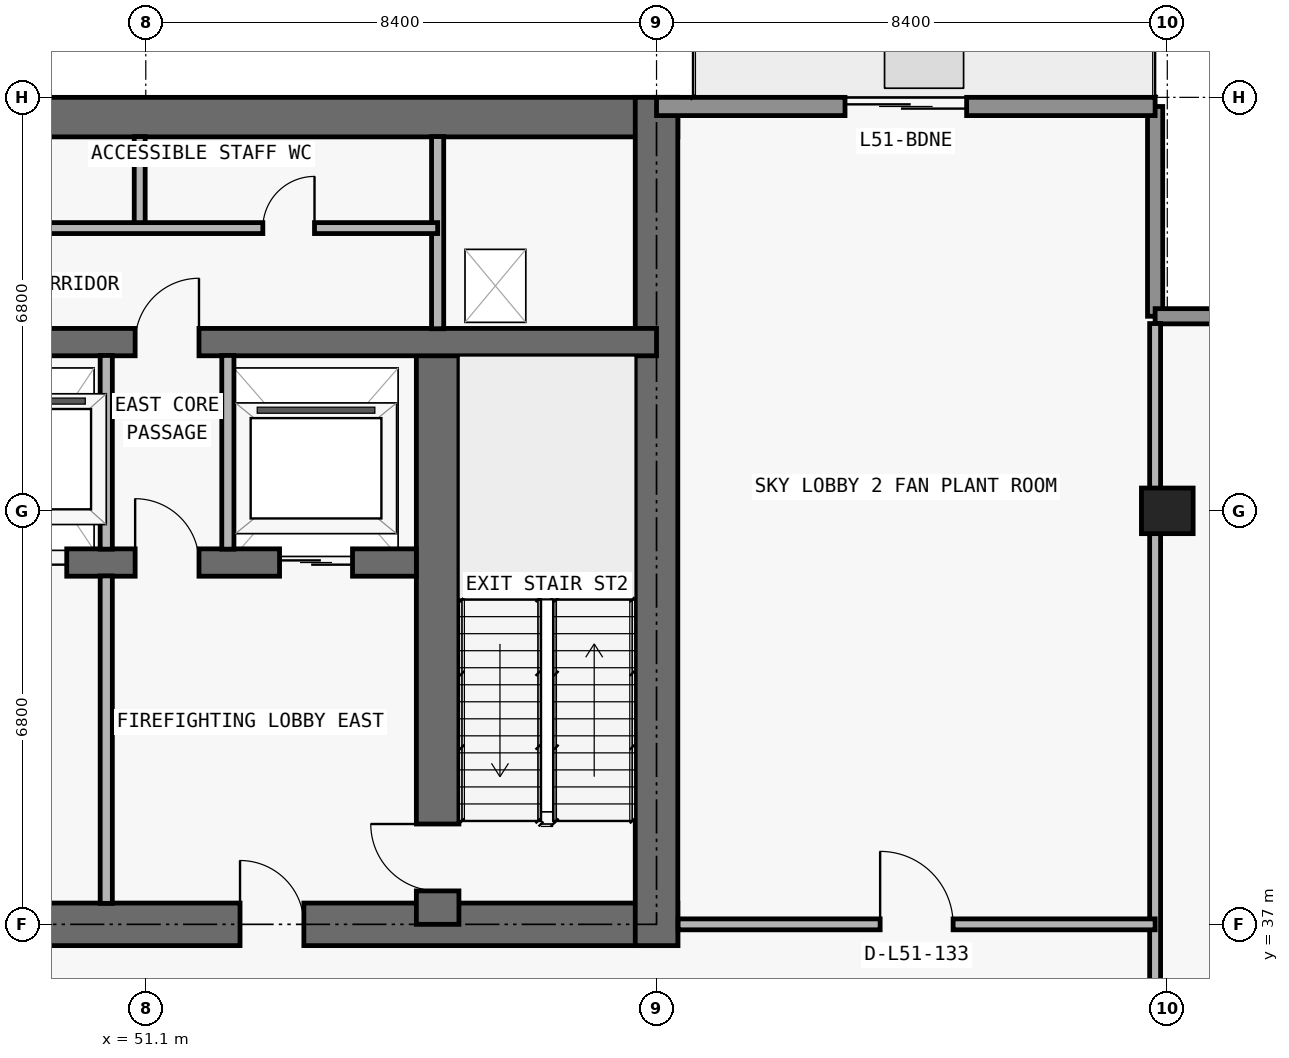
"""IFC4 building model, lengths in metres.
Left out: names, types, materials, properties, quantities, classifications, styles, units other than length and angle.
Written with IfcOpenShell. Run it as: python <this file> out.ifc"""

import sys

from ifc_helpers import new_model, si_unit, direction, frame, frame_2d, origin, origin_2d, place, context, subcontext, project, spatial, rectangle, extrude, element, fill, save


model = new_model("IFC4")
c1 = context("Model", 3, precision=1e-05, world=origin(), true_north=direction((0.0, 1.0)))
c2 = subcontext(c1, "Body", "Model", "MODEL_VIEW")
j1 = project(units=[si_unit("LENGTHUNIT", "METRE"), si_unit("PLANEANGLEUNIT", "RADIAN")], contexts=[c1])
p1 = place(None, origin())
s1 = spatial("IfcSite", under=j1, at=p1, CompositionType="ELEMENT")
p2 = place(p1, origin())
s2 = spatial("IfcBuilding", under=s1, at=p2, CompositionType="ELEMENT")
p3 = place(p2, frame((0.0, 0.0, 183.6)))
s3 = spatial("IfcBuildingStorey", under=s2, at=p3, CompositionType="ELEMENT", Elevation=183.6)
p4 = place(p3, frame((67.9, 43.8, 0.0), z_axis=(0.0, 0.0, 1.0), x_axis=(1.0, 0.0, 0.0)))
e1 = element("IfcColumn", 1, at=p4, inside=s3, PredefinedType="COLUMN", context=c2, shape_type="SweptSolid", body=[
    extrude(rectangle(XDim=0.85, YDim=0.75, at=origin_2d()), origin(), (0.0, 0.0, 1.0), 4.55),
])
p5 = place(p3, frame((17.95, 37.0, 0.0), z_axis=(0.0, 0.0, 1.0), x_axis=(1.0, 0.0, 0.0)))
e2 = element("IfcWall", 2, at=p5, inside=s3, PredefinedType="SHEAR", context=c2, shape_type="SweptSolid", body=[
    extrude(rectangle(XDim=41.9, YDim=0.7, at=frame_2d((20.95, 0.0))), origin(), (0.0, 0.0, 1.0), 4.55),
])
p6 = place(p5, frame((14.35, 0.0, 0.0)))
e3 = element("IfcOpeningElement", 3, at=p6, cuts=e2, PredefinedType="OPENING", context=c2, shape_type="SweptSolid", body=[
    extrude(rectangle(XDim=1.1, YDim=2.15, at=frame_2d((0.55, 1.075))), frame((0.0, 0.36, 0.0), z_axis=(0.0, -1.0, 0.0), x_axis=(1.0, 0.0, 0.0)), (0.0, 0.0, 1.0), 0.72),
])
p7 = place(p5, frame((6.2, 0.0, 0.0)))
e4 = element("IfcOpeningElement", 4, at=p7, cuts=e2, PredefinedType="OPENING", context=c2, shape_type="SweptSolid", body=[
    extrude(rectangle(XDim=1.05, YDim=2.15, at=frame_2d((0.525, 1.075))), frame((0.0, 0.36, 0.0), z_axis=(0.0, -1.0, 0.0), x_axis=(1.0, 0.0, 0.0)), (0.0, 0.0, 1.0), 0.72),
])
p8 = place(p5, frame((34.7, 0.0, 0.0)))
e5 = element("IfcOpeningElement", 5, at=p8, cuts=e2, PredefinedType="OPENING", context=c2, shape_type="SweptSolid", body=[
    extrude(rectangle(XDim=1.05, YDim=2.15, at=frame_2d((0.525, 1.075))), frame((0.0, 0.36, 0.0), z_axis=(0.0, -1.0, 0.0), x_axis=(1.0, 0.0, 0.0)), (0.0, 0.0, 1.0), 0.72),
])
p9 = place(p5, frame((10.812, 0.0, 0.0)))
e6 = element("IfcOpeningElement", 6, at=p9, cuts=e2, PredefinedType="OPENING", context=c2, shape_type="SweptSolid", body=[
    extrude(rectangle(XDim=1.05, YDim=2.15, at=frame_2d((0.525, 1.075))), frame((0.0, 0.36, 0.0), z_axis=(0.0, -1.0, 0.0), x_axis=(1.0, 0.0, 0.0)), (0.0, 0.0, 1.0), 0.72),
])
p10 = place(p5, frame((24.05, 0.0, 0.0)))
e7 = element("IfcOpeningElement", 7, at=p10, cuts=e2, PredefinedType="OPENING", context=c2, shape_type="SweptSolid", body=[
    extrude(rectangle(XDim=1.05, YDim=2.15, at=frame_2d((0.525, 1.075))), frame((0.0, 0.36, 0.0), z_axis=(0.0, -1.0, 0.0), x_axis=(1.0, 0.0, 0.0)), (0.0, 0.0, 1.0), 0.72),
])
p11 = place(p3, frame((17.95, 50.275, 0.0), z_axis=(0.0, 0.0, 1.0), x_axis=(1.0, 0.0, 0.0)))
e8 = element("IfcWall", 8, at=p11, inside=s3, PredefinedType="SHEAR", context=c2, shape_type="SweptSolid", body=[
    extrude(rectangle(XDim=41.9, YDim=0.65, at=frame_2d((20.95, 0.0))), origin(), (0.0, 0.0, 1.0), 4.55),
])
p12 = place(p3, frame((59.5, 36.65, 0.0), z_axis=(0.0, 0.0, 1.0), x_axis=(0.0, 1.0, 0.0)))
e9 = element("IfcWall", 9, at=p12, inside=s3, PredefinedType="SHEAR", context=c2, shape_type="SweptSolid", body=[
    extrude(rectangle(XDim=13.95, YDim=0.7, at=frame_2d((6.975, 0.0))), origin(), (0.0, 0.0, 1.0), 4.55),
])
p13 = place(p3, frame((55.9, 37.0, 0.0), z_axis=(0.0, 0.0, 1.0), x_axis=(0.0, 1.0, 0.0)))
e10 = element("IfcWall", 10, at=p13, inside=s3, PredefinedType="SHEAR", context=c2, shape_type="SweptSolid", body=[
    extrude(rectangle(XDim=9.575, YDim=0.7, at=frame_2d((4.788, 0.0))), origin(), (0.0, 0.0, 1.0), 4.55),
])
p14 = place(p13, frame((0.55, 0.0, 0.0)))
e11 = element("IfcOpeningElement", 11, at=p14, cuts=e10, PredefinedType="OPENING", context=c2, shape_type="SweptSolid", body=[
    extrude(rectangle(XDim=1.1, YDim=2.15, at=frame_2d((0.55, 1.075))), frame((0.0, 0.36, 0.0), z_axis=(0.0, -1.0, 0.0), x_axis=(1.0, 0.0, 0.0)), (0.0, 0.0, 1.0), 0.72),
])
p15 = place(p3, frame((22.25, 42.95, 0.0), z_axis=(0.0, 0.0, 1.0), x_axis=(1.0, 0.0, 0.0)))
e12 = element("IfcWall", 12, at=p15, inside=s3, PredefinedType="SHEAR", context=c2, shape_type="SweptSolid", body=[
    extrude(rectangle(XDim=33.3, YDim=0.45, at=frame_2d((16.65, 0.0))), origin(), (0.0, 0.0, 1.0), 4.55),
])
p16 = place(p15, frame((1.05, 0.0, 0.0)))
e13 = element("IfcOpeningElement", 13, at=p16, cuts=e12, PredefinedType="OPENING", context=c2, shape_type="SweptSolid", body=[
    extrude(rectangle(XDim=1.2, YDim=2.2, at=frame_2d((0.6, 1.1))), frame((0.0, 0.235, 0.0), z_axis=(0.0, -1.0, 0.0), x_axis=(1.0, 0.0, 0.0)), (0.0, 0.0, 1.0), 0.47),
])
p17 = place(p15, frame((31.05, 0.0, 0.0)))
e14 = element("IfcOpeningElement", 14, at=p17, cuts=e12, PredefinedType="OPENING", context=c2, shape_type="SweptSolid", body=[
    extrude(rectangle(XDim=1.2, YDim=2.2, at=frame_2d((0.6, 1.1))), frame((0.0, 0.235, 0.0), z_axis=(0.0, -1.0, 0.0), x_axis=(1.0, 0.0, 0.0)), (0.0, 0.0, 1.0), 0.47),
])
p18 = place(p15, frame((21.4, 0.0, 0.0)))
e15 = element("IfcOpeningElement", 15, at=p18, cuts=e12, PredefinedType="OPENING", context=c2, shape_type="SweptSolid", body=[
    extrude(rectangle(XDim=1.1, YDim=2.2, at=frame_2d((0.55, 1.1))), frame((0.0, 0.235, 0.0), z_axis=(0.0, -1.0, 0.0), x_axis=(1.0, 0.0, 0.0)), (0.0, 0.0, 1.0), 0.47),
])
p19 = place(p15, frame((24.0, 0.0, 0.0)))
e16 = element("IfcOpeningElement", 16, at=p19, cuts=e12, PredefinedType="OPENING", context=c2, shape_type="SweptSolid", body=[
    extrude(rectangle(XDim=1.1, YDim=2.2, at=frame_2d((0.55, 1.1))), frame((0.0, 0.235, 0.0), z_axis=(0.0, -1.0, 0.0), x_axis=(1.0, 0.0, 0.0)), (0.0, 0.0, 1.0), 0.47),
])
p20 = place(p15, frame((26.45, 0.0, 0.0)))
e17 = element("IfcOpeningElement", 17, at=p20, cuts=e12, PredefinedType="OPENING", context=c2, shape_type="SweptSolid", body=[
    extrude(rectangle(XDim=1.1, YDim=2.2, at=frame_2d((0.55, 1.1))), frame((0.0, 0.235, 0.0), z_axis=(0.0, -1.0, 0.0), x_axis=(1.0, 0.0, 0.0)), (0.0, 0.0, 1.0), 0.47),
])
p21 = place(p15, frame((5.95, 0.0, 0.0)))
e18 = element("IfcOpeningElement", 18, at=p21, cuts=e12, PredefinedType="OPENING", context=c2, shape_type="SweptSolid", body=[
    extrude(rectangle(XDim=1.1, YDim=2.2, at=frame_2d((0.55, 1.1))), frame((0.0, 0.235, 0.0), z_axis=(0.0, -1.0, 0.0), x_axis=(1.0, 0.0, 0.0)), (0.0, 0.0, 1.0), 0.47),
])
p22 = place(p15, frame((3.625, 0.0, 0.0)))
e19 = element("IfcOpeningElement", 19, at=p22, cuts=e12, PredefinedType="OPENING", context=c2, shape_type="SweptSolid", body=[
    extrude(rectangle(XDim=1.05, YDim=2.15, at=frame_2d((0.525, 1.075))), frame((0.0, 0.235, 0.0), z_axis=(0.0, -1.0, 0.0), x_axis=(1.0, 0.0, 0.0)), (0.0, 0.0, 1.0), 0.47),
])
p23 = place(p15, frame((28.675, 0.0, 0.0)))
e20 = element("IfcOpeningElement", 20, at=p23, cuts=e12, PredefinedType="OPENING", context=c2, shape_type="SweptSolid", body=[
    extrude(rectangle(XDim=1.05, YDim=2.15, at=frame_2d((0.525, 1.075))), frame((0.0, 0.235, 0.0), z_axis=(0.0, -1.0, 0.0), x_axis=(1.0, 0.0, 0.0)), (0.0, 0.0, 1.0), 0.47),
])
p24 = place(p15, frame((15.975, 0.0, 0.0)))
e21 = element("IfcOpeningElement", 21, at=p24, cuts=e12, PredefinedType="OPENING", context=c2, shape_type="SweptSolid", body=[
    extrude(rectangle(XDim=1.0, YDim=2.2, at=frame_2d((0.5, 1.1))), frame((0.0, 0.235, 0.0), z_axis=(0.0, -1.0, 0.0), x_axis=(1.0, 0.0, 0.0)), (0.0, 0.0, 1.0), 0.47),
])
p25 = place(p3, frame((18.3, 46.575, 0.0), z_axis=(0.0, 0.0, 1.0), x_axis=(1.0, 0.0, 0.0)))
e22 = element("IfcWall", 22, at=p25, inside=s3, PredefinedType="SHEAR", context=c2, shape_type="SweptSolid", body=[
    extrude(rectangle(XDim=41.2, YDim=0.45, at=frame_2d((20.6, 0.0))), origin(), (0.0, 0.0, 1.0), 4.55),
])
p26 = place(p25, frame((7.6, 0.0, 0.0)))
e23 = element("IfcOpeningElement", 23, at=p26, cuts=e22, PredefinedType="OPENING", context=c2, shape_type="SweptSolid", body=[
    extrude(rectangle(XDim=1.0, YDim=2.2, at=frame_2d((0.5, 1.1))), frame((0.0, 0.235, 0.0), z_axis=(0.0, -1.0, 0.0), x_axis=(1.0, 0.0, 0.0)), (0.0, 0.0, 1.0), 0.47),
])
p27 = place(p25, frame((32.625, 0.0, 0.0)))
e24 = element("IfcOpeningElement", 24, at=p27, cuts=e22, PredefinedType="OPENING", context=c2, shape_type="SweptSolid", body=[
    extrude(rectangle(XDim=1.05, YDim=2.15, at=frame_2d((0.525, 1.075))), frame((0.0, 0.235, 0.0), z_axis=(0.0, -1.0, 0.0), x_axis=(1.0, 0.0, 0.0)), (0.0, 0.0, 1.0), 0.47),
])
p28 = place(p3, frame((67.7, 50.45, 0.0), z_axis=(0.0, 0.0, 1.0), x_axis=(0.0, -1.0, 0.0)))
e25 = element("IfcWall", 25, at=p28, inside=s3, PredefinedType="ELEMENTEDWALL", context=c2, shape_type="SweptSolid", body=[
    extrude(rectangle(XDim=3.45, YDim=0.25, at=frame_2d((1.725, 0.0))), origin(), (0.0, 0.0, 1.0), 4.55),
])
p29 = place(p3, frame((67.7, 47.0, 0.0), z_axis=(0.0, 0.0, 1.0), x_axis=(1.0, 0.0, 0.0)))
e26 = element("IfcWall", 26, at=p29, inside=s3, PredefinedType="ELEMENTEDWALL", context=c2, shape_type="SweptSolid", body=[
    extrude(rectangle(XDim=3.85, YDim=0.25, at=frame_2d((1.925, 0.0))), origin(), (0.0, 0.0, 1.0), 4.55),
])
p30 = place(p3, frame((59.5, 50.45, 0.0), z_axis=(0.0, 0.0, 1.0), x_axis=(1.0, 0.0, 0.0)))
e27 = element("IfcWall", 27, at=p30, inside=s3, PredefinedType="STANDARD", context=c2, shape_type="SweptSolid", body=[
    extrude(rectangle(XDim=8.2, YDim=0.3, at=frame_2d((4.1, 0.0))), origin(), (0.0, 0.0, 1.0), 4.55),
])
p31 = place(p30, frame((3.1, 0.0, 0.0)))
e28 = element("IfcOpeningElement", 28, at=p31, cuts=e27, PredefinedType="OPENING", context=c2, shape_type="SweptSolid", body=[
    extrude(rectangle(XDim=2.0, YDim=2.3, at=frame_2d((1.0, 1.15))), frame((0.0, 0.16, 0.0), z_axis=(0.0, -1.0, 0.0), x_axis=(1.0, 0.0, 0.0)), (0.0, 0.0, 1.0), 0.32),
])
p32 = place(p3, frame((50.45, 37.345, 0.0), z_axis=(0.0, 0.0, 1.0), x_axis=(0.0, 1.0, 0.0)))
e29 = element("IfcWall", 29, at=p32, inside=s3, PredefinedType="PARTITIONING", context=c2, shape_type="SweptSolid", body=[
    extrude(rectangle(XDim=5.385, YDim=0.2, at=frame_2d((2.692, 0.0))), origin(), (0.0, 0.0, 1.0), 4.55),
])
p33 = place(p3, frame((50.45, 43.17, 0.0), z_axis=(0.0, 0.0, 1.0), x_axis=(0.0, 1.0, 0.0)))
e30 = element("IfcWall", 30, at=p33, inside=s3, PredefinedType="PARTITIONING", context=c2, shape_type="SweptSolid", body=[
    extrude(rectangle(XDim=3.185, YDim=0.2, at=frame_2d((1.593, 0.0))), origin(), (0.0, 0.0, 1.0), 4.55),
])
p34 = place(p3, frame((51.0, 48.45, 0.0), z_axis=(0.0, 0.0, 1.0), x_axis=(0.0, 1.0, 0.0)))
e31 = element("IfcWall", 31, at=p34, inside=s3, PredefinedType="PARTITIONING", context=c2, shape_type="SweptSolid", body=[
    extrude(rectangle(XDim=1.505, YDim=0.18, at=frame_2d((0.752, 0.0))), origin(), (0.0, 0.0, 1.0), 4.55),
])
p35 = place(p3, frame((52.45, 43.17, 0.0), z_axis=(0.0, 0.0, 1.0), x_axis=(0.0, 1.0, 0.0)))
e32 = element("IfcWall", 32, at=p35, inside=s3, PredefinedType="PARTITIONING", context=c2, shape_type="SweptSolid", body=[
    extrude(rectangle(XDim=3.185, YDim=0.2, at=frame_2d((1.593, 0.0))), origin(), (0.0, 0.0, 1.0), 4.55),
])
p36 = place(p3, frame((55.9, 46.795, 0.0), z_axis=(0.0, 0.0, 1.0), x_axis=(0.0, 1.0, 0.0)))
e33 = element("IfcWall", 33, at=p36, inside=s3, PredefinedType="PARTITIONING", context=c2, shape_type="SweptSolid", body=[
    extrude(rectangle(XDim=3.16, YDim=0.2, at=frame_2d((1.58, 0.0))), origin(), (0.0, 0.0, 1.0), 4.55),
])
p37 = place(p3, frame((67.7, 11.32, 0.0), z_axis=(0.0, 0.0, 1.0), x_axis=(0.0, 1.0, 0.0)))
e34 = element("IfcWall", 34, at=p37, inside=s3, PredefinedType="PARTITIONING", context=c2, shape_type="SweptSolid", body=[
    extrude(rectangle(XDim=35.56, YDim=0.18, at=frame_2d((17.78, 0.0))), origin(), (0.0, 0.0, 1.0), 3.514),
])
p38 = place(p3, frame((59.855, 37.0, 0.0), z_axis=(0.0, 0.0, 1.0), x_axis=(1.0, 0.0, 0.0)))
e35 = element("IfcWall", 35, at=p38, inside=s3, PredefinedType="PARTITIONING", context=c2, shape_type="SweptSolid", body=[
    extrude(rectangle(XDim=7.845, YDim=0.18, at=frame_2d((3.922, 0.0))), origin(), (0.0, 0.0, 1.0), 4.55),
])
p39 = place(p38, frame((3.323, 0.0, 0.0)))
e36 = element("IfcOpeningElement", 36, at=p39, cuts=e35, PredefinedType="OPENING", context=c2, shape_type="SweptSolid", body=[
    extrude(rectangle(XDim=1.2, YDim=2.2, at=frame_2d((0.6, 1.1))), frame((0.0, 0.1, 0.0), z_axis=(0.0, -1.0, 0.0), x_axis=(1.0, 0.0, 0.0)), (0.0, 0.0, 1.0), 0.2),
])
p40 = place(p3, frame((41.2, 48.45, 0.0), z_axis=(0.0, 0.0, 1.0), x_axis=(1.0, 0.0, 0.0)))
e37 = element("IfcWall", 37, at=p40, inside=s3, PredefinedType="PARTITIONING", context=c2, shape_type="SweptSolid", body=[
    extrude(rectangle(XDim=14.7, YDim=0.18, at=frame_2d((7.35, 0.0))), origin(), (0.0, 0.0, 1.0), 4.55),
])
p41 = place(p40, frame((1.85, 0.0, 0.0)))
e38 = element("IfcOpeningElement", 38, at=p41, cuts=e37, PredefinedType="OPENING", context=c2, shape_type="SweptSolid", body=[
    extrude(rectangle(XDim=1.2, YDim=2.2, at=frame_2d((0.6, 1.1))), frame((0.0, 0.1, 0.0), z_axis=(0.0, -1.0, 0.0), x_axis=(1.0, 0.0, 0.0)), (0.0, 0.0, 1.0), 0.2),
])
p42 = place(p40, frame((6.75, 0.0, 0.0)))
e39 = element("IfcOpeningElement", 39, at=p42, cuts=e37, PredefinedType="OPENING", context=c2, shape_type="SweptSolid", body=[
    extrude(rectangle(XDim=1.2, YDim=2.2, at=frame_2d((0.6, 1.1))), frame((0.0, 0.1, 0.0), z_axis=(0.0, -1.0, 0.0), x_axis=(1.0, 0.0, 0.0)), (0.0, 0.0, 1.0), 0.2),
])
p43 = place(p40, frame((11.825, 0.0, 0.0)))
e40 = element("IfcOpeningElement", 40, at=p43, cuts=e37, PredefinedType="OPENING", context=c2, shape_type="SweptSolid", body=[
    extrude(rectangle(XDim=0.85, YDim=2.1, at=frame_2d((0.425, 1.05))), frame((0.0, 0.1, 0.0), z_axis=(0.0, -1.0, 0.0), x_axis=(1.0, 0.0, 0.0)), (0.0, 0.0, 1.0), 0.2),
])
p44 = place(p31, origin())
e41 = element("IfcDoor", 41, at=p44, inside=s3, OperationType="DOUBLE_DOOR_SLIDING", PredefinedType="DOOR", context=c2, shape_type="SweptSolid", body=[
    extrude(rectangle(XDim=2.0, YDim=2.3, at=frame_2d((1.0, 1.15))), frame((0.0, 0.025, 0.0), z_axis=(0.0, -1.0, 0.0), x_axis=(1.0, 0.0, 0.0)), (0.0, 0.0, 1.0), 0.05),
])
fill(e28, e41)
p45 = place(p17, origin())
e42 = element("IfcDoor", 42, at=p45, inside=s3, OperationType="DOUBLE_DOOR_SLIDING", PredefinedType="DOOR", context=c2, shape_type="SweptSolid", body=[
    extrude(rectangle(XDim=1.2, YDim=2.2, at=frame_2d((0.6, 1.1))), frame((0.0, 0.025, 0.0), z_axis=(0.0, -1.0, 0.0), x_axis=(1.0, 0.0, 0.0)), (0.0, 0.0, 1.0), 0.05),
])
fill(e14, e42)
p46 = place(p20, origin())
e43 = element("IfcDoor", 43, at=p46, inside=s3, OperationType="DOUBLE_DOOR_SLIDING", PredefinedType="DOOR", context=c2, shape_type="SweptSolid", body=[
    extrude(rectangle(XDim=1.1, YDim=2.2, at=frame_2d((0.55, 1.1))), frame((0.0, 0.025, 0.0), z_axis=(0.0, -1.0, 0.0), x_axis=(1.0, 0.0, 0.0)), (0.0, 0.0, 1.0), 0.05),
])
fill(e17, e43)
p47 = place(p8, origin())
e44 = element("IfcDoor", 44, at=p47, inside=s3, OperationType="SINGLE_SWING_LEFT", PredefinedType="DOOR", context=c2, shape_type="SweptSolid", body=[
    extrude(rectangle(XDim=1.05, YDim=2.15, at=frame_2d((0.525, 1.075))), frame((0.0, 0.025, 0.0), z_axis=(0.0, -1.0, 0.0), x_axis=(1.0, 0.0, 0.0)), (0.0, 0.0, 1.0), 0.05),
])
fill(e5, e44)
p48 = place(p14, origin())
e45 = element("IfcDoor", 45, at=p48, inside=s3, OperationType="SINGLE_SWING_RIGHT", PredefinedType="DOOR", context=c2, shape_type="SweptSolid", body=[
    extrude(rectangle(XDim=1.1, YDim=2.15, at=frame_2d((0.55, 1.075))), frame((0.0, 0.025, 0.0), z_axis=(0.0, -1.0, 0.0), x_axis=(1.0, 0.0, 0.0)), (0.0, 0.0, 1.0), 0.05),
])
fill(e11, e45)
p49 = place(p23, origin())
e46 = element("IfcDoor", 46, at=p49, inside=s3, OperationType="SINGLE_SWING_LEFT", PredefinedType="DOOR", context=c2, shape_type="SweptSolid", body=[
    extrude(rectangle(XDim=1.05, YDim=2.15, at=frame_2d((0.525, 1.075))), frame((0.0, 0.025, 0.0), z_axis=(0.0, -1.0, 0.0), x_axis=(1.0, 0.0, 0.0)), (0.0, 0.0, 1.0), 0.05),
])
fill(e20, e46)
p50 = place(p27, origin())
e47 = element("IfcDoor", 47, at=p50, inside=s3, OperationType="SINGLE_SWING_RIGHT", PredefinedType="DOOR", context=c2, shape_type="SweptSolid", body=[
    extrude(rectangle(XDim=1.05, YDim=2.15, at=frame_2d((0.525, 1.075))), frame((0.0, 0.025, 0.0), z_axis=(0.0, -1.0, 0.0), x_axis=(1.0, 0.0, 0.0)), (0.0, 0.0, 1.0), 0.05),
])
fill(e24, e47)
p51 = place(p43, origin())
e48 = element("IfcDoor", 48, at=p51, inside=s3, OperationType="SINGLE_SWING_RIGHT", PredefinedType="DOOR", context=c2, shape_type="SweptSolid", body=[
    extrude(rectangle(XDim=0.85, YDim=2.1, at=frame_2d((0.425, 1.05))), frame((0.0, 0.025, 0.0), z_axis=(0.0, -1.0, 0.0), x_axis=(1.0, 0.0, 0.0)), (0.0, 0.0, 1.0), 0.05),
])
fill(e40, e48)
p52 = place(p39, origin())
e49 = element("IfcDoor", 49, at=p52, inside=s3, OperationType="SINGLE_SWING_LEFT", PredefinedType="DOOR", context=c2, shape_type="SweptSolid", body=[
    extrude(rectangle(XDim=1.2, YDim=2.2, at=frame_2d((0.6, 1.1))), frame((0.0, 0.025, 0.0), z_axis=(0.0, -1.0, 0.0), x_axis=(1.0, 0.0, 0.0)), (0.0, 0.0, 1.0), 0.05),
])
fill(e36, e49)
save(model, sys.argv[1])
